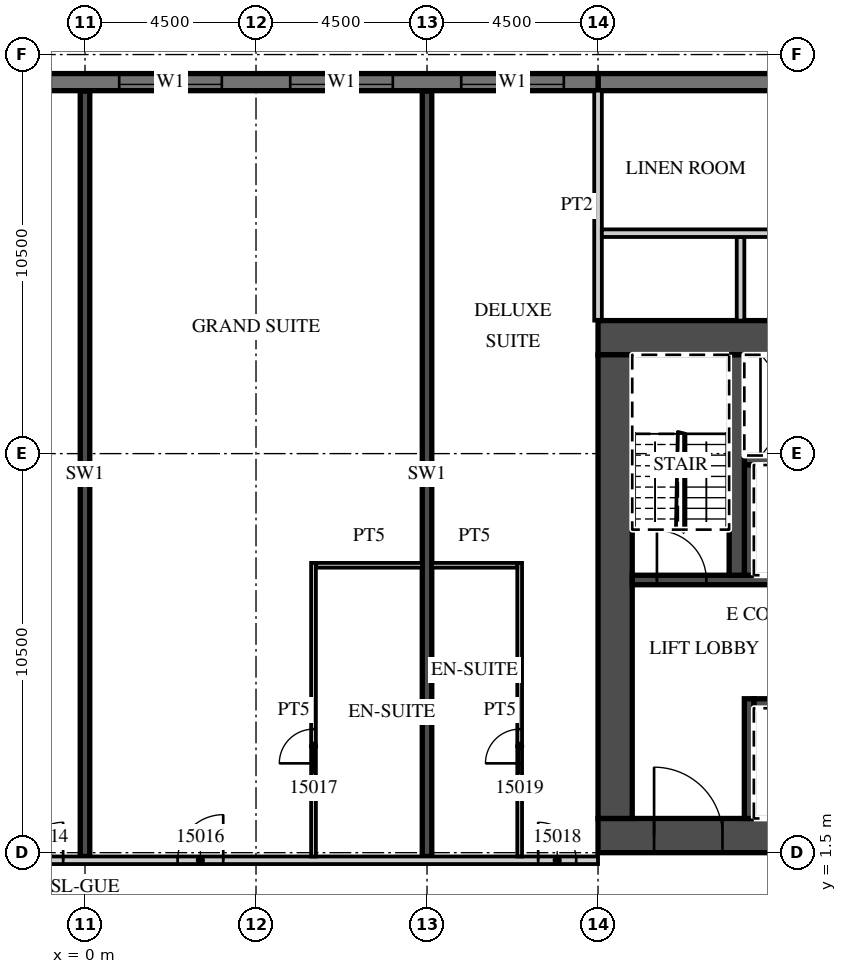
"""IFC4 building model, lengths in metres.
Left out: names, types, materials, properties, quantities, classifications, styles, units other than length and angle.
Written with IfcOpenShell. Run it as: python <this file> out.ifc"""

import sys

from ifc_helpers import new_model, si_unit, direction, frame, frame_2d, origin, place, context, subcontext, project, spatial, rectangle, extrude, element, fill, save


model = new_model("IFC4")
c1 = context("Model", 3, precision=1e-05, world=origin(), true_north=direction((0.0, 1.0)))
c2 = subcontext(c1, "Body", "Model", "MODEL_VIEW")
j1 = project(units=[si_unit("LENGTHUNIT", "METRE"), si_unit("PLANEANGLEUNIT", "RADIAN")], contexts=[c1])
p1 = place(None, origin())
s1 = spatial("IfcSite", under=j1, at=p1, CompositionType="ELEMENT")
p2 = place(p1, origin())
s2 = spatial("IfcBuilding", under=s1, at=p2, CompositionType="ELEMENT")
p3 = place(p2, frame((0.0, 0.0, 79.8)))
s3 = spatial("IfcBuildingStorey", under=s2, at=p3, CompositionType="ELEMENT", Elevation=79.8)
for number, where, z_axis, x_axis in (
    (1, (0.0, 1.4, 0.0), (0.0, 0.0, 1.0), (0.0, 1.0, 0.0)),
    (2, (9.0, 1.4, 0.0), (0.0, 0.0, 1.0), (0.0, 1.0, 0.0)),
):
    element("IfcWall", number, at=place(p3, frame(where, z_axis=z_axis, x_axis=x_axis)), inside=s3, PredefinedType="SHEAR", context=c2, shape_type="SweptSolid", body=[
        extrude(rectangle(XDim=20.14, YDim=0.25, at=frame_2d((10.07, 0.0))), origin(), (0.0, 0.0, 1.0), 3.3),
    ])
p4 = place(p3, frame((31.5, 21.775, 0.0), z_axis=(0.0, 0.0, 1.0), x_axis=(-1.0, 0.0, 0.0)))
e3 = element("IfcWall", 3, at=p4, inside=s3, PredefinedType="SOLIDWALL", context=c2, shape_type="SweptSolid", body=[
    extrude(rectangle(XDim=18.0, YDim=0.45, at=frame_2d((9.0, 0.0))), origin(), (0.0, 0.0, 1.0), 3.02),
])
p5 = place(p3, frame((13.5, 21.775, 0.0), z_axis=(0.0, 0.0, 1.0), x_axis=(-1.0, 0.0, 0.0)))
e4 = element("IfcWall", 4, at=p5, inside=s3, PredefinedType="SOLIDWALL", context=c2, shape_type="SweptSolid", body=[
    extrude(rectangle(XDim=54.5, YDim=0.45, at=frame_2d((27.25, 0.0))), origin(), (0.0, 0.0, 1.0), 3.02),
])
p6 = place(p5, frame((0.9, 0.0, 0.45)))
e5 = element("IfcOpeningElement", 5, at=p6, cuts=e4, PredefinedType="OPENING", context=c2, shape_type="SweptSolid", body=[
    extrude(rectangle(XDim=2.7, YDim=2.25, at=frame_2d((1.35, 1.125))), frame((0.0, 0.235, 0.0), z_axis=(0.0, -1.0, 0.0), x_axis=(1.0, 0.0, 0.0)), (0.0, 0.0, 1.0), 0.47),
])
p7 = place(p5, frame((5.4, 0.0, 0.45)))
e6 = element("IfcOpeningElement", 6, at=p7, cuts=e4, PredefinedType="OPENING", context=c2, shape_type="SweptSolid", body=[
    extrude(rectangle(XDim=2.7, YDim=2.25, at=frame_2d((1.35, 1.125))), frame((0.0, 0.235, 0.0), z_axis=(0.0, -1.0, 0.0), x_axis=(1.0, 0.0, 0.0)), (0.0, 0.0, 1.0), 0.47),
])
p8 = place(p5, frame((9.9, 0.0, 0.45)))
e7 = element("IfcOpeningElement", 7, at=p8, cuts=e4, PredefinedType="OPENING", context=c2, shape_type="SweptSolid", body=[
    extrude(rectangle(XDim=2.7, YDim=2.25, at=frame_2d((1.35, 1.125))), frame((0.0, 0.235, 0.0), z_axis=(0.0, -1.0, 0.0), x_axis=(1.0, 0.0, 0.0)), (0.0, 0.0, 1.0), 0.47),
])
p9 = place(p5, frame((14.4, 0.0, 0.45)))
e8 = element("IfcOpeningElement", 8, at=p9, cuts=e4, PredefinedType="OPENING", context=c2, shape_type="SweptSolid", body=[
    extrude(rectangle(XDim=2.7, YDim=2.25, at=frame_2d((1.35, 1.125))), frame((0.0, 0.235, 0.0), z_axis=(0.0, -1.0, 0.0), x_axis=(1.0, 0.0, 0.0)), (0.0, 0.0, 1.0), 0.47),
])
p10 = place(p5, frame((18.9, 0.0, 0.45)))
e9 = element("IfcOpeningElement", 9, at=p10, cuts=e4, PredefinedType="OPENING", context=c2, shape_type="SweptSolid", body=[
    extrude(rectangle(XDim=2.7, YDim=2.25, at=frame_2d((1.35, 1.125))), frame((0.0, 0.235, 0.0), z_axis=(0.0, -1.0, 0.0), x_axis=(1.0, 0.0, 0.0)), (0.0, 0.0, 1.0), 0.47),
])
p11 = place(p5, frame((23.4, 0.0, 0.45)))
e10 = element("IfcOpeningElement", 10, at=p11, cuts=e4, PredefinedType="OPENING", context=c2, shape_type="SweptSolid", body=[
    extrude(rectangle(XDim=2.7, YDim=2.25, at=frame_2d((1.35, 1.125))), frame((0.0, 0.235, 0.0), z_axis=(0.0, -1.0, 0.0), x_axis=(1.0, 0.0, 0.0)), (0.0, 0.0, 1.0), 0.47),
])
p12 = place(p5, frame((27.9, 0.0, 0.45)))
e11 = element("IfcOpeningElement", 11, at=p12, cuts=e4, PredefinedType="OPENING", context=c2, shape_type="SweptSolid", body=[
    extrude(rectangle(XDim=2.7, YDim=2.25, at=frame_2d((1.35, 1.125))), frame((0.0, 0.235, 0.0), z_axis=(0.0, -1.0, 0.0), x_axis=(1.0, 0.0, 0.0)), (0.0, 0.0, 1.0), 0.47),
])
p13 = place(p5, frame((32.4, 0.0, 0.45)))
e12 = element("IfcOpeningElement", 12, at=p13, cuts=e4, PredefinedType="OPENING", context=c2, shape_type="SweptSolid", body=[
    extrude(rectangle(XDim=2.7, YDim=2.25, at=frame_2d((1.35, 1.125))), frame((0.0, 0.235, 0.0), z_axis=(0.0, -1.0, 0.0), x_axis=(1.0, 0.0, 0.0)), (0.0, 0.0, 1.0), 0.47),
])
p14 = place(p5, frame((36.9, 0.0, 0.45)))
e13 = element("IfcOpeningElement", 13, at=p14, cuts=e4, PredefinedType="OPENING", context=c2, shape_type="SweptSolid", body=[
    extrude(rectangle(XDim=2.7, YDim=2.25, at=frame_2d((1.35, 1.125))), frame((0.0, 0.235, 0.0), z_axis=(0.0, -1.0, 0.0), x_axis=(1.0, 0.0, 0.0)), (0.0, 0.0, 1.0), 0.47),
])
p15 = place(p5, frame((41.4, 0.0, 0.45)))
e14 = element("IfcOpeningElement", 14, at=p15, cuts=e4, PredefinedType="OPENING", context=c2, shape_type="SweptSolid", body=[
    extrude(rectangle(XDim=2.7, YDim=2.25, at=frame_2d((1.35, 1.125))), frame((0.0, 0.235, 0.0), z_axis=(0.0, -1.0, 0.0), x_axis=(1.0, 0.0, 0.0)), (0.0, 0.0, 1.0), 0.47),
])
p16 = place(p5, frame((45.9, 0.0, 0.45)))
e15 = element("IfcOpeningElement", 15, at=p16, cuts=e4, PredefinedType="OPENING", context=c2, shape_type="SweptSolid", body=[
    extrude(rectangle(XDim=2.7, YDim=2.25, at=frame_2d((1.35, 1.125))), frame((0.0, 0.235, 0.0), z_axis=(0.0, -1.0, 0.0), x_axis=(1.0, 0.0, 0.0)), (0.0, 0.0, 1.0), 0.47),
])
p17 = place(p5, frame((50.4, 0.0, 0.45)))
e16 = element("IfcOpeningElement", 16, at=p17, cuts=e4, PredefinedType="OPENING", context=c2, shape_type="SweptSolid", body=[
    extrude(rectangle(XDim=2.7, YDim=2.25, at=frame_2d((1.35, 1.125))), frame((0.0, 0.235, 0.0), z_axis=(0.0, -1.0, 0.0), x_axis=(1.0, 0.0, 0.0)), (0.0, 0.0, 1.0), 0.47),
])
p18 = place(p3, frame((13.5, 15.5, 0.0), z_axis=(0.0, 0.0, 1.0), x_axis=(0.0, 1.0, 0.0)))
e17 = element("IfcWall", 17, at=p18, inside=s3, PredefinedType="PARTITIONING", context=c2, shape_type="SweptSolid", body=[
    extrude(rectangle(XDim=6.05, YDim=0.2, at=frame_2d((3.025, 0.0))), origin(), (0.0, 0.0, 1.0), 3.02),
])
p19 = place(p3, frame((-44.55, 1.3, 0.0), z_axis=(0.0, 0.0, 1.0), x_axis=(1.0, 0.0, 0.0)))
e18 = element("IfcWall", 18, at=p19, inside=s3, PredefinedType="PARTITIONING", context=c2, shape_type="SweptSolid", body=[
    extrude(rectangle(XDim=58.05, YDim=0.2, at=frame_2d((29.025, 0.0))), origin(), (0.0, 0.0, 1.0), 3.02),
])
p20 = place(p19, frame((0.525, 0.0, 0.0)))
e19 = element("IfcOpeningElement", 19, at=p20, cuts=e18, PredefinedType="OPENING", context=c2, shape_type="SweptSolid", body=[
    extrude(rectangle(XDim=1.0, YDim=2.1, at=frame_2d((0.5, 1.05))), frame((0.0, 0.11, 0.0), z_axis=(0.0, -1.0, 0.0), x_axis=(1.0, 0.0, 0.0)), (0.0, 0.0, 1.0), 0.22),
])
p21 = place(p19, frame((4.625, 0.0, 0.0)))
e20 = element("IfcOpeningElement", 20, at=p21, cuts=e18, PredefinedType="OPENING", context=c2, shape_type="SweptSolid", body=[
    extrude(rectangle(XDim=1.0, YDim=2.1, at=frame_2d((0.5, 1.05))), frame((0.0, 0.11, 0.0), z_axis=(0.0, -1.0, 0.0), x_axis=(1.0, 0.0, 0.0)), (0.0, 0.0, 1.0), 0.22),
])
p22 = place(p19, frame((10.987, 0.0, 0.0)))
e21 = element("IfcOpeningElement", 21, at=p22, cuts=e18, PredefinedType="OPENING", context=c2, shape_type="SweptSolid", body=[
    extrude(rectangle(XDim=1.2, YDim=2.1, at=frame_2d((0.6, 1.05))), frame((0.0, 0.11, 0.0), z_axis=(0.0, -1.0, 0.0), x_axis=(1.0, 0.0, 0.0)), (0.0, 0.0, 1.0), 0.22),
])
p23 = place(p19, frame((19.987, 0.0, 0.0)))
e22 = element("IfcOpeningElement", 22, at=p23, cuts=e18, PredefinedType="OPENING", context=c2, shape_type="SweptSolid", body=[
    extrude(rectangle(XDim=1.2, YDim=2.1, at=frame_2d((0.6, 1.05))), frame((0.0, 0.11, 0.0), z_axis=(0.0, -1.0, 0.0), x_axis=(1.0, 0.0, 0.0)), (0.0, 0.0, 1.0), 0.22),
])
p24 = place(p19, frame((28.987, 0.0, 0.0)))
e23 = element("IfcOpeningElement", 23, at=p24, cuts=e18, PredefinedType="OPENING", context=c2, shape_type="SweptSolid", body=[
    extrude(rectangle(XDim=1.2, YDim=2.1, at=frame_2d((0.6, 1.05))), frame((0.0, 0.11, 0.0), z_axis=(0.0, -1.0, 0.0), x_axis=(1.0, 0.0, 0.0)), (0.0, 0.0, 1.0), 0.22),
])
p25 = place(p19, frame((36.125, 0.0, 0.0)))
e24 = element("IfcOpeningElement", 24, at=p25, cuts=e18, PredefinedType="OPENING", context=c2, shape_type="SweptSolid", body=[
    extrude(rectangle(XDim=1.0, YDim=2.1, at=frame_2d((0.5, 1.05))), frame((0.0, 0.11, 0.0), z_axis=(0.0, -1.0, 0.0), x_axis=(1.0, 0.0, 0.0)), (0.0, 0.0, 1.0), 0.22),
])
p26 = place(p19, frame((42.975, 0.0, 0.0)))
e25 = element("IfcOpeningElement", 25, at=p26, cuts=e18, PredefinedType="OPENING", context=c2, shape_type="SweptSolid", body=[
    extrude(rectangle(XDim=1.0, YDim=2.1, at=frame_2d((0.5, 1.05))), frame((0.0, 0.11, 0.0), z_axis=(0.0, -1.0, 0.0), x_axis=(1.0, 0.0, 0.0)), (0.0, 0.0, 1.0), 0.22),
])
p27 = place(p19, frame((46.987, 0.0, 0.0)))
e26 = element("IfcOpeningElement", 26, at=p27, cuts=e18, PredefinedType="OPENING", context=c2, shape_type="SweptSolid", body=[
    extrude(rectangle(XDim=1.2, YDim=2.1, at=frame_2d((0.6, 1.05))), frame((0.0, 0.11, 0.0), z_axis=(0.0, -1.0, 0.0), x_axis=(1.0, 0.0, 0.0)), (0.0, 0.0, 1.0), 0.22),
])
p28 = place(p19, frame((56.475, 0.0, 0.0)))
e27 = element("IfcOpeningElement", 27, at=p28, cuts=e18, PredefinedType="OPENING", context=c2, shape_type="SweptSolid", body=[
    extrude(rectangle(XDim=1.0, YDim=2.1, at=frame_2d((0.5, 1.05))), frame((0.0, 0.11, 0.0), z_axis=(0.0, -1.0, 0.0), x_axis=(1.0, 0.0, 0.0)), (0.0, 0.0, 1.0), 0.22),
])
p29 = place(p3, frame((6.013, 1.4, 0.0), z_axis=(0.0, 0.0, 1.0), x_axis=(0.0, 1.0, 0.0)))
e28 = element("IfcWall", 28, at=p29, inside=s3, PredefinedType="PARTITIONING", context=c2, shape_type="SweptSolid", body=[
    extrude(rectangle(XDim=7.725, YDim=0.125, at=frame_2d((3.863, 0.0))), origin(), (0.0, 0.0, 1.0), 3.02),
])
p30 = place(p29, frame((2.45, 0.0, 0.0)))
e29 = element("IfcOpeningElement", 29, at=p30, cuts=e28, PredefinedType="OPENING", context=c2, shape_type="SweptSolid", body=[
    extrude(rectangle(XDim=0.9, YDim=2.1, at=frame_2d((0.45, 1.05))), frame((0.0, 0.073, 0.0), z_axis=(0.0, -1.0, 0.0), x_axis=(1.0, 0.0, 0.0)), (0.0, 0.0, 1.0), 0.145),
])
p31 = place(p3, frame((6.075, 9.062, 0.0), z_axis=(0.0, 0.0, 1.0), x_axis=(1.0, 0.0, 0.0)))
e30 = element("IfcWall", 30, at=p31, inside=s3, PredefinedType="PARTITIONING", context=c2, shape_type="SweptSolid", body=[
    extrude(rectangle(XDim=2.8, YDim=0.125, at=frame_2d((1.4, 0.0))), origin(), (0.0, 0.0, 1.0), 3.02),
])
p32 = place(p3, frame((11.438, 1.4, 0.0), z_axis=(0.0, 0.0, 1.0), x_axis=(0.0, 1.0, 0.0)))
e31 = element("IfcWall", 31, at=p32, inside=s3, PredefinedType="PARTITIONING", context=c2, shape_type="SweptSolid", body=[
    extrude(rectangle(XDim=7.725, YDim=0.125, at=frame_2d((3.863, 0.0))), origin(), (0.0, 0.0, 1.0), 3.02),
])
p33 = place(p32, frame((2.45, 0.0, 0.0)))
e32 = element("IfcOpeningElement", 32, at=p33, cuts=e31, PredefinedType="OPENING", context=c2, shape_type="SweptSolid", body=[
    extrude(rectangle(XDim=0.9, YDim=2.1, at=frame_2d((0.45, 1.05))), frame((0.0, 0.073, 0.0), z_axis=(0.0, -1.0, 0.0), x_axis=(1.0, 0.0, 0.0)), (0.0, 0.0, 1.0), 0.145),
])
p34 = place(p3, frame((9.125, 9.062, 0.0), z_axis=(0.0, 0.0, 1.0), x_axis=(1.0, 0.0, 0.0)))
e33 = element("IfcWall", 33, at=p34, inside=s3, PredefinedType="PARTITIONING", context=c2, shape_type="SweptSolid", body=[
    extrude(rectangle(XDim=2.25, YDim=0.125, at=frame_2d((1.125, 0.0))), origin(), (0.0, 0.0, 1.0), 3.02),
])
p35 = place(p3, frame((13.5, 1.95, 0.0), z_axis=(0.0, 0.0, 1.0), x_axis=(1.0, 0.0, 0.0)))
e34 = element("IfcWall", 34, at=p35, inside=s3, PredefinedType="SHEAR", context=c2, shape_type="SweptSolid", body=[
    extrude(rectangle(XDim=18.0, YDim=0.9, at=frame_2d((9.0, 0.0))), origin(), (0.0, 0.0, 1.0), 3.02),
])
p36 = place(p35, frame((1.475, 0.0, 0.0)))
e35 = element("IfcOpeningElement", 35, at=p36, cuts=e34, PredefinedType="OPENING", context=c2, shape_type="SweptSolid", body=[
    extrude(rectangle(XDim=1.8, YDim=2.1, at=frame_2d((0.9, 1.05))), frame((0.0, 0.46, 0.0), z_axis=(0.0, -1.0, 0.0), x_axis=(1.0, 0.0, 0.0)), (0.0, 0.0, 1.0), 0.92),
])
p37 = place(p3, frame((13.5, 15.05, 0.0), z_axis=(0.0, 0.0, 1.0), x_axis=(1.0, 0.0, 0.0)))
e36 = element("IfcWall", 36, at=p37, inside=s3, PredefinedType="SHEAR", context=c2, shape_type="SweptSolid", body=[
    extrude(rectangle(XDim=6.8, YDim=0.9, at=frame_2d((3.4, 0.0))), origin(), (0.0, 0.0, 1.0), 3.02),
])
p38 = place(p37, frame((4.725, 0.0, 0.0)))
e37 = element("IfcOpeningElement", 37, at=p38, cuts=e36, PredefinedType="OPENING", context=c2, shape_type="SweptSolid", body=[
    extrude(rectangle(XDim=1.2, YDim=2.1, at=frame_2d((0.6, 1.05))), frame((0.0, 0.46, 0.0), z_axis=(0.0, -1.0, 0.0), x_axis=(1.0, 0.0, 0.0)), (0.0, 0.0, 1.0), 0.92),
])
p39 = place(p3, frame((13.95, 2.4, 0.0), z_axis=(0.0, 0.0, 1.0), x_axis=(0.0, 1.0, 0.0)))
e38 = element("IfcWall", 38, at=p39, inside=s3, PredefinedType="SHEAR", context=c2, shape_type="SweptSolid", body=[
    extrude(rectangle(XDim=12.2, YDim=0.9, at=frame_2d((6.1, 0.0))), origin(), (0.0, 0.0, 1.0), 3.02),
])
p40 = place(p3, frame((17.6, 5.425, 0.0), z_axis=(0.0, 0.0, 1.0), x_axis=(1.0, 0.0, 0.0)))
e39 = element("IfcWall", 39, at=p40, inside=s3, PredefinedType="SHEAR", context=c2, shape_type="SweptSolid", body=[
    extrude(rectangle(XDim=13.0, YDim=0.25, at=frame_2d((6.5, 0.0))), origin(), (0.0, 0.0, 1.0), 3.02),
])
p41 = place(p3, frame((17.475, 2.4, 0.0), z_axis=(0.0, 0.0, 1.0), x_axis=(0.0, 1.0, 0.0)))
e40 = element("IfcWall", 40, at=p41, inside=s3, PredefinedType="SHEAR", context=c2, shape_type="SweptSolid", body=[
    extrude(rectangle(XDim=3.15, YDim=0.25, at=frame_2d((1.575, 0.0))), origin(), (0.0, 0.0, 1.0), 3.02),
])
p42 = place(p3, frame((14.4, 8.675, 0.0), z_axis=(0.0, 0.0, 1.0), x_axis=(1.0, 0.0, 0.0)))
e41 = element("IfcWall", 41, at=p42, inside=s3, PredefinedType="SHEAR", context=c2, shape_type="SweptSolid", body=[
    extrude(rectangle(XDim=16.2, YDim=0.25, at=frame_2d((8.1, 0.0))), origin(), (0.0, 0.0, 1.0), 3.02),
])
p43 = place(p42, frame((14.4, 0.0, 0.0)))
e42 = element("IfcOpeningElement", 42, at=p43, cuts=e41, PredefinedType="OPENING", context=c2, shape_type="SweptSolid", body=[
    extrude(rectangle(XDim=1.2, YDim=2.1, at=frame_2d((0.6, 1.05))), frame((0.0, 0.135, 0.0), z_axis=(0.0, -1.0, 0.0), x_axis=(1.0, 0.0, 0.0)), (0.0, 0.0, 1.0), 0.27),
])
p44 = place(p42, frame((11.75, 0.0, 0.0)))
e43 = element("IfcOpeningElement", 43, at=p44, cuts=e41, PredefinedType="OPENING", context=c2, shape_type="SweptSolid", body=[
    extrude(rectangle(XDim=1.2, YDim=2.1, at=frame_2d((0.6, 1.05))), frame((0.0, 0.135, 0.0), z_axis=(0.0, -1.0, 0.0), x_axis=(1.0, 0.0, 0.0)), (0.0, 0.0, 1.0), 0.27),
])
p45 = place(p42, frame((9.1, 0.0, 0.0)))
e44 = element("IfcOpeningElement", 44, at=p45, cuts=e41, PredefinedType="OPENING", context=c2, shape_type="SweptSolid", body=[
    extrude(rectangle(XDim=1.2, YDim=2.1, at=frame_2d((0.6, 1.05))), frame((0.0, 0.135, 0.0), z_axis=(0.0, -1.0, 0.0), x_axis=(1.0, 0.0, 0.0)), (0.0, 0.0, 1.0), 0.27),
])
p46 = place(p42, frame((0.65, 0.0, 0.0)))
e45 = element("IfcOpeningElement", 45, at=p46, cuts=e41, PredefinedType="OPENING", context=c2, shape_type="SweptSolid", body=[
    extrude(rectangle(XDim=1.3, YDim=2.1, at=frame_2d((0.65, 1.05))), frame((0.0, 0.135, 0.0), z_axis=(0.0, -1.0, 0.0), x_axis=(1.0, 0.0, 0.0)), (0.0, 0.0, 1.0), 0.27),
])
p47 = place(p3, frame((17.35, 11.825, 0.0), z_axis=(0.0, 0.0, 1.0), x_axis=(1.0, 0.0, 0.0)))
e46 = element("IfcWall", 46, at=p47, inside=s3, PredefinedType="SHEAR", context=c2, shape_type="SweptSolid", body=[
    extrude(rectangle(XDim=13.25, YDim=0.25, at=frame_2d((6.625, 0.0))), origin(), (0.0, 0.0, 1.0), 3.02),
])
p48 = place(p3, frame((17.475, 8.8, 0.0), z_axis=(0.0, 0.0, 1.0), x_axis=(0.0, 1.0, 0.0)))
e47 = element("IfcWall", 47, at=p48, inside=s3, PredefinedType="SHEAR", context=c2, shape_type="SweptSolid", body=[
    extrude(rectangle(XDim=2.9, YDim=0.25, at=frame_2d((1.45, 0.0))), origin(), (0.0, 0.0, 1.0), 3.02),
])
p49 = place(p3, frame((17.15, 8.8, 0.0), z_axis=(0.0, 0.0, 1.0), x_axis=(0.0, 1.0, 0.0)))
e48 = element("IfcWall", 48, at=p49, inside=s3, PredefinedType="SHEAR", context=c2, shape_type="SweptSolid", body=[
    extrude(rectangle(XDim=5.8, YDim=0.4, at=frame_2d((2.9, 0.0))), origin(), (0.0, 0.0, 1.0), 3.02),
])
p50 = place(p3, frame((17.25, 15.5, 0.0), z_axis=(0.0, 0.0, 1.0), x_axis=(0.0, 1.0, 0.0)))
e49 = element("IfcWall", 49, at=p50, inside=s3, PredefinedType="PARTITIONING", context=c2, shape_type="SweptSolid", body=[
    extrude(rectangle(XDim=2.2, YDim=0.2, at=frame_2d((1.1, 0.0))), origin(), (0.0, 0.0, 1.0), 3.02),
])
p51 = place(p3, frame((13.6, 17.8, 0.0), z_axis=(0.0, 0.0, 1.0), x_axis=(1.0, 0.0, 0.0)))
e50 = element("IfcWall", 50, at=p51, inside=s3, PredefinedType="PARTITIONING", context=c2, shape_type="SweptSolid", body=[
    extrude(rectangle(XDim=30.95, YDim=0.2, at=frame_2d((15.475, 0.0))), origin(), (0.0, 0.0, 1.0), 3.02),
])
p52 = place(p51, frame((16.613, 0.0, 0.0)))
e51 = element("IfcOpeningElement", 51, at=p52, cuts=e50, PredefinedType="OPENING", context=c2, shape_type="SweptSolid", body=[
    extrude(rectangle(XDim=0.9, YDim=2.1, at=frame_2d((0.45, 1.05))), frame((0.0, 0.11, 0.0), z_axis=(0.0, -1.0, 0.0), x_axis=(1.0, 0.0, 0.0)), (0.0, 0.0, 1.0), 0.22),
])
p53 = place(p51, frame((8.312, 0.0, 0.0)))
e52 = element("IfcOpeningElement", 52, at=p53, cuts=e50, PredefinedType="OPENING", context=c2, shape_type="SweptSolid", body=[
    extrude(rectangle(XDim=0.9, YDim=2.1, at=frame_2d((0.45, 1.05))), frame((0.0, 0.11, 0.0), z_axis=(0.0, -1.0, 0.0), x_axis=(1.0, 0.0, 0.0)), (0.0, 0.0, 1.0), 0.22),
])
p54 = place(p6, origin())
e53 = element("IfcWindow", 53, at=p54, inside=s3, PartitioningType="SINGLE_PANEL", PredefinedType="WINDOW", context=c2, shape_type="SweptSolid", body=[
    extrude(rectangle(XDim=2.7, YDim=2.25, at=frame_2d((1.35, 1.125))), frame((0.0, 0.09, 0.0), z_axis=(0.0, -1.0, 0.0), x_axis=(1.0, 0.0, 0.0)), (0.0, 0.0, 1.0), 0.06),
])
fill(e5, e53)
p55 = place(p7, origin())
e54 = element("IfcWindow", 54, at=p55, inside=s3, PartitioningType="SINGLE_PANEL", PredefinedType="WINDOW", context=c2, shape_type="SweptSolid", body=[
    extrude(rectangle(XDim=2.7, YDim=2.25, at=frame_2d((1.35, 1.125))), frame((0.0, 0.09, 0.0), z_axis=(0.0, -1.0, 0.0), x_axis=(1.0, 0.0, 0.0)), (0.0, 0.0, 1.0), 0.06),
])
fill(e6, e54)
p56 = place(p8, origin())
e55 = element("IfcWindow", 55, at=p56, inside=s3, PartitioningType="SINGLE_PANEL", PredefinedType="WINDOW", context=c2, shape_type="SweptSolid", body=[
    extrude(rectangle(XDim=2.7, YDim=2.25, at=frame_2d((1.35, 1.125))), frame((0.0, 0.09, 0.0), z_axis=(0.0, -1.0, 0.0), x_axis=(1.0, 0.0, 0.0)), (0.0, 0.0, 1.0), 0.06),
])
fill(e7, e55)
p57 = place(p26, origin())
e56 = element("IfcDoor", 56, at=p57, inside=s3, OperationType="SINGLE_SWING_RIGHT", PredefinedType="DOOR", context=c2, shape_type="SweptSolid", body=[
    extrude(rectangle(XDim=1.0, YDim=2.1, at=frame_2d((0.5, 1.05))), frame((0.0, 0.025, 0.0), z_axis=(0.0, -1.0, 0.0), x_axis=(1.0, 0.0, 0.0)), (0.0, 0.0, 1.0), 0.05),
])
fill(e25, e56)
p58 = place(p27, origin())
e57 = element("IfcDoor", 57, at=p58, inside=s3, OperationType="SINGLE_SWING_RIGHT", PredefinedType="DOOR", context=c2, shape_type="SweptSolid", body=[
    extrude(rectangle(XDim=1.2, YDim=2.1, at=frame_2d((0.6, 1.05))), frame((0.0, 0.025, 0.0), z_axis=(0.0, -1.0, 0.0), x_axis=(1.0, 0.0, 0.0)), (0.0, 0.0, 1.0), 0.05),
])
fill(e26, e57)
p59 = place(p30, origin())
e58 = element("IfcDoor", 58, at=p59, inside=s3, OperationType="SINGLE_SWING_LEFT", PredefinedType="DOOR", context=c2, shape_type="SweptSolid", body=[
    extrude(rectangle(XDim=0.9, YDim=2.1, at=frame_2d((0.45, 1.05))), frame((0.0, 0.025, 0.0), z_axis=(0.0, -1.0, 0.0), x_axis=(1.0, 0.0, 0.0)), (0.0, 0.0, 1.0), 0.05),
])
fill(e29, e58)
p60 = place(p28, origin())
e59 = element("IfcDoor", 59, at=p60, inside=s3, OperationType="SINGLE_SWING_LEFT", PredefinedType="DOOR", context=c2, shape_type="SweptSolid", body=[
    extrude(rectangle(XDim=1.0, YDim=2.1, at=frame_2d((0.5, 1.05))), frame((0.0, 0.025, 0.0), z_axis=(0.0, -1.0, 0.0), x_axis=(1.0, 0.0, 0.0)), (0.0, 0.0, 1.0), 0.05),
])
fill(e27, e59)
p61 = place(p33, origin())
e60 = element("IfcDoor", 60, at=p61, inside=s3, OperationType="SINGLE_SWING_LEFT", PredefinedType="DOOR", context=c2, shape_type="SweptSolid", body=[
    extrude(rectangle(XDim=0.9, YDim=2.1, at=frame_2d((0.45, 1.05))), frame((0.0, 0.025, 0.0), z_axis=(0.0, -1.0, 0.0), x_axis=(1.0, 0.0, 0.0)), (0.0, 0.0, 1.0), 0.05),
])
fill(e32, e60)
p62 = place(p36, origin())
e61 = element("IfcDoor", 61, at=p62, inside=s3, OperationType="DOUBLE_DOOR_DOUBLE_SWING", PredefinedType="DOOR", context=c2, shape_type="SweptSolid", body=[
    extrude(rectangle(XDim=1.8, YDim=2.1, at=frame_2d((0.9, 1.05))), frame((0.0, 0.025, 0.0), z_axis=(0.0, -1.0, 0.0), x_axis=(1.0, 0.0, 0.0)), (0.0, 0.0, 1.0), 0.05),
])
fill(e35, e61)
p63 = place(p46, origin())
e62 = element("IfcDoor", 62, at=p63, inside=s3, OperationType="SINGLE_SWING_LEFT", PredefinedType="DOOR", context=c2, shape_type="SweptSolid", body=[
    extrude(rectangle(XDim=1.3, YDim=2.1, at=frame_2d((0.65, 1.05))), frame((0.0, 0.025, 0.0), z_axis=(0.0, -1.0, 0.0), x_axis=(1.0, 0.0, 0.0)), (0.0, 0.0, 1.0), 0.05),
])
fill(e45, e62)
save(model, sys.argv[1])
